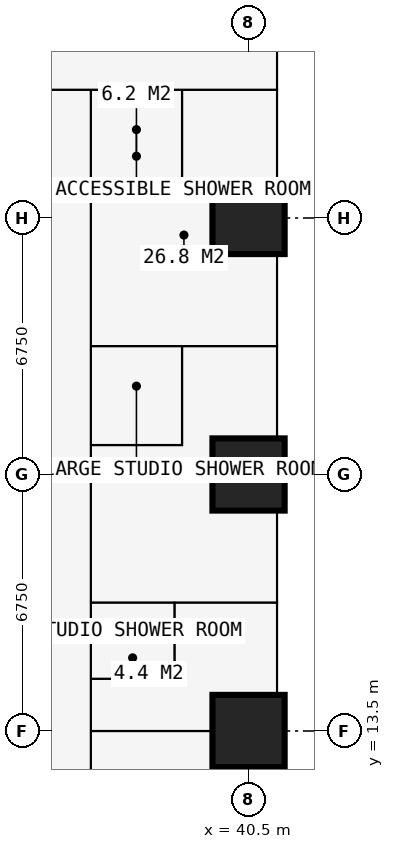
"""IFC4 building model, lengths in metres.
Left out: names, types, materials, properties, quantities, classifications, styles, units other than length and angle.
Written with IfcOpenShell. Run it as: python <this file> out.ifc"""

import sys

from ifc_helpers import new_model, si_unit, direction, frame, frame_2d, origin, origin_2d, place, context, subcontext, project, spatial, rectangle, extrude, element, fill, save


model = new_model("IFC4")
c1 = context("Model", 3, precision=1e-05, world=origin(), true_north=direction((0.0, 1.0)))
c2 = subcontext(c1, "Body", "Model", "MODEL_VIEW")
j1 = project(units=[si_unit("LENGTHUNIT", "METRE"), si_unit("PLANEANGLEUNIT", "RADIAN")], contexts=[c1])
p1 = place(None, origin())
s1 = spatial("IfcSite", under=j1, at=p1, CompositionType="ELEMENT")
p2 = place(p1, origin())
s2 = spatial("IfcBuilding", under=s1, at=p2, CompositionType="ELEMENT")
p3 = place(p2, frame((0.0, 0.0, 18.0)))
s3 = spatial("IfcBuildingStorey", under=s2, at=p3, CompositionType="ELEMENT", Elevation=18.0)
for number, where, z_axis, x_axis in (
    (1, (40.5, 13.5, 0.0), (0.0, 0.0, 1.0), (1.0, 0.0, 0.0)),
    (2, (40.5, 20.25, 0.0), (0.0, 0.0, 1.0), (1.0, 0.0, 0.0)),
    (3, (40.5, 27.0, 0.0), (0.0, 0.0, 1.0), (1.0, 0.0, 0.0)),
):
    element("IfcColumn", number, at=place(p3, frame(where, z_axis=z_axis, x_axis=x_axis)), inside=s3, PredefinedType="COLUMN", context=c2, shape_type="SweptSolid", body=[
        extrude(rectangle(XDim=1.9, YDim=1.9, at=origin_2d()), origin(), (0.0, 0.0, 1.0), 3.6),
    ])
p4 = place(p3, frame((41.25, 20.25, 0.0), z_axis=(0.0, 0.0, 1.0), x_axis=(0.0, -1.0, 0.0)))
e4 = element("IfcWall", 4, at=p4, inside=s3, PredefinedType="SOLIDWALL", context=c2, shape_type="SweptSolid", body=[
    extrude(rectangle(XDim=6.75, YDim=0.15, at=frame_2d((3.375, 0.0))), origin(), (0.0, 0.0, 1.0), 3.375),
])
p5 = place(p4, frame((0.996, 0.0, 0.0)))
e5 = element("IfcOpeningElement", 5, at=p5, cuts=e4, PredefinedType="OPENING", context=c2, shape_type="SweptSolid", body=[
    extrude(rectangle(XDim=1.0, YDim=2.2, at=frame_2d((0.5, 1.1))), frame((0.0, 0.085, 0.0), z_axis=(0.0, -1.0, 0.0), x_axis=(1.0, 0.0, 0.0)), (0.0, 0.0, 1.0), 0.17),
])
p6 = place(p4, frame((2.042, 0.0, 0.9)))
e6 = element("IfcOpeningElement", 6, at=p6, cuts=e4, PredefinedType="OPENING", context=c2, shape_type="SweptSolid", body=[
    extrude(rectangle(XDim=1.2, YDim=1.8, at=frame_2d((0.6, 0.9))), frame((0.0, 0.085, 0.0), z_axis=(0.0, -1.0, 0.0), x_axis=(1.0, 0.0, 0.0)), (0.0, 0.0, 1.0), 0.17),
])
p7 = place(p4, frame((4.754, 0.0, 0.0)))
e7 = element("IfcOpeningElement", 7, at=p7, cuts=e4, PredefinedType="OPENING", context=c2, shape_type="SweptSolid", body=[
    extrude(rectangle(XDim=1.0, YDim=2.2, at=frame_2d((0.5, 1.1))), frame((0.0, 0.085, 0.0), z_axis=(0.0, -1.0, 0.0), x_axis=(1.0, 0.0, 0.0)), (0.0, 0.0, 1.0), 0.17),
])
p8 = place(p4, frame((3.508, 0.0, 0.9)))
e8 = element("IfcOpeningElement", 8, at=p8, cuts=e4, PredefinedType="OPENING", context=c2, shape_type="SweptSolid", body=[
    extrude(rectangle(XDim=1.2, YDim=1.8, at=frame_2d((0.6, 0.9))), frame((0.0, 0.085, 0.0), z_axis=(0.0, -1.0, 0.0), x_axis=(1.0, 0.0, 0.0)), (0.0, 0.0, 1.0), 0.17),
])
p9 = place(p3, frame((41.35, 16.875, 0.0), z_axis=(0.0, 0.0, 1.0), x_axis=(1.0, 0.0, 0.0)))
e9 = element("IfcWall", 9, at=p9, inside=s3, PredefinedType="USERDEFINED", context=c2, shape_type="SweptSolid", body=[
    extrude(rectangle(XDim=2.2, YDim=1.0, at=frame_2d((1.1, 0.0))), origin(), (0.0, 0.0, 1.0), 0.9),
])
p10 = place(p3, frame((30.375, 30.375, 0.0), z_axis=(0.0, 0.0, 1.0), x_axis=(1.0, 0.0, 0.0)))
e10 = element("IfcWall", 10, at=p10, inside=s3, PredefinedType="PARTITIONING", context=c2, shape_type="SweptSolid", body=[
    extrude(rectangle(XDim=10.859, YDim=0.15, at=frame_2d((5.429, 0.0))), origin(), (0.0, 0.0, 1.0), 3.375),
])
p11 = place(p10, frame((4.725, 0.0, 0.0)))
e11 = element("IfcOpeningElement", 11, at=p11, cuts=e10, PredefinedType="OPENING", context=c2, shape_type="SweptSolid", body=[
    extrude(rectangle(XDim=1.0, YDim=2.2, at=frame_2d((0.5, 1.1))), frame((0.0, 0.085, 0.0), z_axis=(0.0, -1.0, 0.0), x_axis=(1.0, 0.0, 0.0)), (0.0, 0.0, 1.0), 0.17),
])
p12 = place(p3, frame((36.35, 6.75, 0.0), z_axis=(0.0, 0.0, 1.0), x_axis=(0.0, 1.0, 0.0)))
e12 = element("IfcWall", 12, at=p12, inside=s3, PredefinedType="PARTITIONING", context=c2, shape_type="SweptSolid", body=[
    extrude(rectangle(XDim=23.625, YDim=0.15, at=frame_2d((11.812, 0.0))), origin(), (0.0, 0.0, 1.0), 3.375),
])
p13 = place(p12, frame((18.475, 0.0, 0.0)))
e13 = element("IfcOpeningElement", 13, at=p13, cuts=e12, PredefinedType="OPENING", context=c2, shape_type="SweptSolid", body=[
    extrude(rectangle(XDim=0.95, YDim=2.2, at=frame_2d((0.475, 1.1))), frame((0.0, 0.085, 0.0), z_axis=(0.0, -1.0, 0.0), x_axis=(1.0, 0.0, 0.0)), (0.0, 0.0, 1.0), 0.17),
])
p14 = place(p12, frame((11.725, 0.0, 0.0)))
e14 = element("IfcOpeningElement", 14, at=p14, cuts=e12, PredefinedType="OPENING", context=c2, shape_type="SweptSolid", body=[
    extrude(rectangle(XDim=0.95, YDim=2.2, at=frame_2d((0.475, 1.1))), frame((0.0, 0.085, 0.0), z_axis=(0.0, -1.0, 0.0), x_axis=(1.0, 0.0, 0.0)), (0.0, 0.0, 1.0), 0.17),
])
p15 = place(p12, frame((6.95, 0.0, 0.0)))
e15 = element("IfcOpeningElement", 15, at=p15, cuts=e12, PredefinedType="OPENING", context=c2, shape_type="SweptSolid", body=[
    extrude(rectangle(XDim=0.95, YDim=2.2, at=frame_2d((0.475, 1.1))), frame((0.0, 0.085, 0.0), z_axis=(0.0, -1.0, 0.0), x_axis=(1.0, 0.0, 0.0)), (0.0, 0.0, 1.0), 0.17),
])
p16 = place(p3, frame((36.35, 13.5, 0.0), z_axis=(0.0, 0.0, 1.0), x_axis=(1.0, 0.0, 0.0)))
e16 = element("IfcWall", 16, at=p16, inside=s3, PredefinedType="PARTITIONING", context=c2, shape_type="SweptSolid", body=[
    extrude(rectangle(XDim=4.884, YDim=0.15, at=frame_2d((2.442, 0.0))), origin(), (0.0, 0.0, 1.0), 2.877),
])
p17 = place(p3, frame((36.35, 14.875, 0.0), z_axis=(0.0, 0.0, 1.0), x_axis=(1.0, 0.0, 0.0)))
e17 = element("IfcWall", 17, at=p17, inside=s3, PredefinedType="PARTITIONING", context=c2, shape_type="SweptSolid", body=[
    extrude(rectangle(XDim=2.2, YDim=0.1, at=frame_2d((1.1, 0.0))), origin(), (0.0, 0.0, 1.0), 3.375),
])
p18 = place(p3, frame((36.35, 16.875, 0.0), z_axis=(0.0, 0.0, 1.0), x_axis=(1.0, 0.0, 0.0)))
e18 = element("IfcWall", 18, at=p18, inside=s3, PredefinedType="PARTITIONING", context=c2, shape_type="SweptSolid", body=[
    extrude(rectangle(XDim=4.884, YDim=0.175, at=frame_2d((2.442, 0.0))), origin(), (0.0, 0.0, 1.0), 3.375),
])
p19 = place(p18, frame((0.65, 0.0, 0.0)))
e19 = element("IfcOpeningElement", 19, at=p19, cuts=e18, PredefinedType="OPENING", context=c2, shape_type="SweptSolid", body=[
    extrude(rectangle(XDim=0.9, YDim=2.2, at=frame_2d((0.45, 1.1))), frame((0.0, 0.097, 0.0), z_axis=(0.0, -1.0, 0.0), x_axis=(1.0, 0.0, 0.0)), (0.0, 0.0, 1.0), 0.195),
])
p20 = place(p3, frame((36.35, 21.025, 0.0), z_axis=(0.0, 0.0, 1.0), x_axis=(1.0, 0.0, 0.0)))
e20 = element("IfcWall", 20, at=p20, inside=s3, PredefinedType="PARTITIONING", context=c2, shape_type="SweptSolid", body=[
    extrude(rectangle(XDim=2.4, YDim=0.1, at=frame_2d((1.2, 0.0))), origin(), (0.0, 0.0, 1.0), 3.375),
])
p21 = place(p3, frame((36.35, 23.625, 0.0), z_axis=(0.0, 0.0, 1.0), x_axis=(1.0, 0.0, 0.0)))
e21 = element("IfcWall", 21, at=p21, inside=s3, PredefinedType="PARTITIONING", context=c2, shape_type="SweptSolid", body=[
    extrude(rectangle(XDim=4.884, YDim=0.175, at=frame_2d((2.442, 0.0))), origin(), (0.0, 0.0, 1.0), 3.375),
])
p22 = place(p21, frame((0.75, 0.0, 0.0)))
e22 = element("IfcOpeningElement", 22, at=p22, cuts=e21, PredefinedType="OPENING", context=c2, shape_type="SweptSolid", body=[
    extrude(rectangle(XDim=0.9, YDim=2.2, at=frame_2d((0.45, 1.1))), frame((0.0, 0.097, 0.0), z_axis=(0.0, -1.0, 0.0), x_axis=(1.0, 0.0, 0.0)), (0.0, 0.0, 1.0), 0.195),
])
p23 = place(p3, frame((36.35, 27.775, 0.0), z_axis=(0.0, 0.0, 1.0), x_axis=(1.0, 0.0, 0.0)))
e23 = element("IfcWall", 23, at=p23, inside=s3, PredefinedType="PARTITIONING", context=c2, shape_type="SweptSolid", body=[
    extrude(rectangle(XDim=2.4, YDim=0.1, at=frame_2d((1.2, 0.0))), origin(), (0.0, 0.0, 1.0), 3.375),
])
p24 = place(p3, frame((38.55, 14.875, 0.0), z_axis=(0.0, 0.0, 1.0), x_axis=(0.0, 1.0, 0.0)))
e24 = element("IfcWall", 24, at=p24, inside=s3, PredefinedType="PARTITIONING", context=c2, shape_type="SweptSolid", body=[
    extrude(rectangle(XDim=2.0, YDim=0.1, at=frame_2d((1.0, 0.0))), origin(), (0.0, 0.0, 1.0), 3.375),
])
p25 = place(p3, frame((38.75, 21.025, 0.0), z_axis=(0.0, 0.0, 1.0), x_axis=(0.0, 1.0, 0.0)))
e25 = element("IfcWall", 25, at=p25, inside=s3, PredefinedType="PARTITIONING", context=c2, shape_type="SweptSolid", body=[
    extrude(rectangle(XDim=2.6, YDim=0.1, at=frame_2d((1.3, 0.0))), origin(), (0.0, 0.0, 1.0), 3.375),
])
p26 = place(p3, frame((38.75, 27.775, 0.0), z_axis=(0.0, 0.0, 1.0), x_axis=(0.0, 1.0, 0.0)))
e26 = element("IfcWall", 26, at=p26, inside=s3, PredefinedType="PARTITIONING", context=c2, shape_type="SweptSolid", body=[
    extrude(rectangle(XDim=2.6, YDim=0.1, at=frame_2d((1.3, 0.0))), origin(), (0.0, 0.0, 1.0), 3.375),
])
p27 = place(p26, frame((0.85, 0.0, 0.0)))
e27 = element("IfcOpeningElement", 27, at=p27, cuts=e26, PredefinedType="OPENING", context=c2, shape_type="SweptSolid", body=[
    extrude(rectangle(XDim=0.9, YDim=2.2, at=frame_2d((0.45, 1.1))), frame((0.0, 0.06, 0.0), z_axis=(0.0, -1.0, 0.0), x_axis=(1.0, 0.0, 0.0)), (0.0, 0.0, 1.0), 0.12),
])
p28 = place(p5, origin())
e28 = element("IfcDoor", 28, at=p28, inside=s3, OperationType="SINGLE_SWING_LEFT", PredefinedType="DOOR", context=c2, shape_type="SweptSolid", body=[
    extrude(rectangle(XDim=1.0, YDim=2.2, at=frame_2d((0.5, 1.1))), frame((0.0, 0.025, 0.0), z_axis=(0.0, -1.0, 0.0), x_axis=(1.0, 0.0, 0.0)), (0.0, 0.0, 1.0), 0.05),
])
fill(e5, e28)
p29 = place(p6, origin())
e29 = element("IfcWindow", 29, at=p29, inside=s3, PartitioningType="SINGLE_PANEL", PredefinedType="WINDOW", context=c2, shape_type="SweptSolid", body=[
    extrude(rectangle(XDim=1.2, YDim=1.8, at=frame_2d((0.6, 0.9))), frame((0.0, 0.03, 0.0), z_axis=(0.0, -1.0, 0.0), x_axis=(1.0, 0.0, 0.0)), (0.0, 0.0, 1.0), 0.06),
])
fill(e6, e29)
p30 = place(p7, origin())
e30 = element("IfcDoor", 30, at=p30, inside=s3, OperationType="SINGLE_SWING_RIGHT", PredefinedType="DOOR", context=c2, shape_type="SweptSolid", body=[
    extrude(rectangle(XDim=1.0, YDim=2.2, at=frame_2d((0.5, 1.1))), frame((0.0, 0.025, 0.0), z_axis=(0.0, -1.0, 0.0), x_axis=(1.0, 0.0, 0.0)), (0.0, 0.0, 1.0), 0.05),
])
fill(e7, e30)
p31 = place(p8, origin())
e31 = element("IfcWindow", 31, at=p31, inside=s3, PartitioningType="SINGLE_PANEL", PredefinedType="WINDOW", context=c2, shape_type="SweptSolid", body=[
    extrude(rectangle(XDim=1.2, YDim=1.8, at=frame_2d((0.6, 0.9))), frame((0.0, 0.03, 0.0), z_axis=(0.0, -1.0, 0.0), x_axis=(1.0, 0.0, 0.0)), (0.0, 0.0, 1.0), 0.06),
])
fill(e8, e31)
p32 = place(p13, origin())
e32 = element("IfcDoor", 32, at=p32, inside=s3, OperationType="SINGLE_SWING_LEFT", PredefinedType="DOOR", context=c2, shape_type="SweptSolid", body=[
    extrude(rectangle(XDim=0.95, YDim=2.2, at=frame_2d((0.475, 1.1))), frame((0.0, 0.025, 0.0), z_axis=(0.0, -1.0, 0.0), x_axis=(1.0, 0.0, 0.0)), (0.0, 0.0, 1.0), 0.05),
])
fill(e13, e32)
p33 = place(p27, origin())
e33 = element("IfcDoor", 33, at=p33, inside=s3, OperationType="SINGLE_SWING_RIGHT", PredefinedType="DOOR", context=c2, shape_type="SweptSolid", body=[
    extrude(rectangle(XDim=0.9, YDim=2.2, at=frame_2d((0.45, 1.1))), frame((0.0, 0.025, 0.0), z_axis=(0.0, -1.0, 0.0), x_axis=(1.0, 0.0, 0.0)), (0.0, 0.0, 1.0), 0.05),
])
fill(e27, e33)
p34 = place(p14, origin())
e34 = element("IfcDoor", 34, at=p34, inside=s3, OperationType="SINGLE_SWING_LEFT", PredefinedType="DOOR", context=c2, shape_type="SweptSolid", body=[
    extrude(rectangle(XDim=0.95, YDim=2.2, at=frame_2d((0.475, 1.1))), frame((0.0, 0.025, 0.0), z_axis=(0.0, -1.0, 0.0), x_axis=(1.0, 0.0, 0.0)), (0.0, 0.0, 1.0), 0.05),
])
fill(e14, e34)
p35 = place(p22, origin())
e35 = element("IfcDoor", 35, at=p35, inside=s3, OperationType="SINGLE_SWING_RIGHT", PredefinedType="DOOR", context=c2, shape_type="SweptSolid", body=[
    extrude(rectangle(XDim=0.9, YDim=2.2, at=frame_2d((0.45, 1.1))), frame((0.0, 0.025, 0.0), z_axis=(0.0, -1.0, 0.0), x_axis=(1.0, 0.0, 0.0)), (0.0, 0.0, 1.0), 0.05),
])
fill(e22, e35)
p36 = place(p15, origin())
e36 = element("IfcDoor", 36, at=p36, inside=s3, OperationType="SINGLE_SWING_LEFT", PredefinedType="DOOR", context=c2, shape_type="SweptSolid", body=[
    extrude(rectangle(XDim=0.95, YDim=2.2, at=frame_2d((0.475, 1.1))), frame((0.0, 0.025, 0.0), z_axis=(0.0, -1.0, 0.0), x_axis=(1.0, 0.0, 0.0)), (0.0, 0.0, 1.0), 0.05),
])
fill(e15, e36)
p37 = place(p19, origin())
e37 = element("IfcDoor", 37, at=p37, inside=s3, OperationType="SINGLE_SWING_RIGHT", PredefinedType="DOOR", context=c2, shape_type="SweptSolid", body=[
    extrude(rectangle(XDim=0.9, YDim=2.2, at=frame_2d((0.45, 1.1))), frame((0.0, 0.025, 0.0), z_axis=(0.0, -1.0, 0.0), x_axis=(1.0, 0.0, 0.0)), (0.0, 0.0, 1.0), 0.05),
])
fill(e19, e37)
p38 = place(p11, origin())
e38 = element("IfcDoor", 38, at=p38, inside=s3, OperationType="SINGLE_SWING_LEFT", PredefinedType="DOOR", context=c2, shape_type="SweptSolid", body=[
    extrude(rectangle(XDim=1.0, YDim=2.2, at=frame_2d((0.5, 1.1))), frame((0.0, 0.025, 0.0), z_axis=(0.0, -1.0, 0.0), x_axis=(1.0, 0.0, 0.0)), (0.0, 0.0, 1.0), 0.05),
])
fill(e11, e38)
save(model, sys.argv[1])
